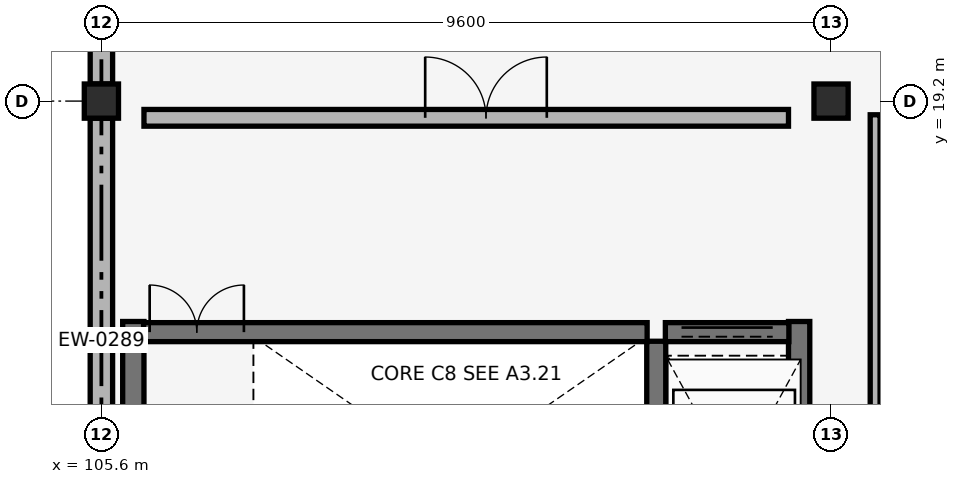
"""IFC4 building model, lengths in metres.
Left out: names, types, materials, properties, quantities, classifications, styles, units other than length and angle.
Written with IfcOpenShell. Run it as: python <this file> out.ifc"""

import sys

from ifc_helpers import new_model, si_unit, direction, frame, frame_2d, origin, origin_2d, place, context, subcontext, project, spatial, rectangle, extrude, element, fill, save


model = new_model("IFC4")
c1 = context("Model", 3, precision=1e-05, world=origin(), true_north=direction((0.0, 1.0)))
c2 = subcontext(c1, "Body", "Model", "MODEL_VIEW")
j1 = project(units=[si_unit("LENGTHUNIT", "METRE"), si_unit("PLANEANGLEUNIT", "RADIAN")], contexts=[c1])
p1 = place(None, origin())
s1 = spatial("IfcSite", under=j1, at=p1, CompositionType="ELEMENT")
p2 = place(p1, origin())
s2 = spatial("IfcBuilding", under=s1, at=p2, CompositionType="ELEMENT")
p3 = place(p2, frame((0.0, 0.0, 16.66)))
s3 = spatial("IfcBuildingStorey", under=s2, at=p3, CompositionType="ELEMENT", Elevation=16.66)
for number, where, z_axis, x_axis in (
    (1, (105.6, 19.2, 0.0), (0.0, 0.0, 1.0), (1.0, 0.0, 0.0)),
    (2, (115.2, 19.2, 0.0), (0.0, 0.0, 1.0), (1.0, 0.0, 0.0)),
):
    element("IfcColumn", number, at=place(p3, frame(where, z_axis=z_axis, x_axis=x_axis)), inside=s3, PredefinedType="COLUMN", context=c2, shape_type="SweptSolid", body=[
        extrude(rectangle(XDim=0.45, YDim=0.45, at=origin_2d()), origin(), (0.0, 0.0, 1.0), 4.08),
    ])
p4 = place(p3, frame((105.6, 18.975, 0.0), z_axis=(0.0, 0.0, 1.0), x_axis=(0.0, -1.0, 0.0)))
e3 = element("IfcWall", 3, at=p4, inside=s3, PredefinedType="SOLIDWALL", context=c2, shape_type="SweptSolid", body=[
    extrude(rectangle(XDim=6.75, YDim=0.295, at=frame_2d((3.375, 0.0))), origin(), (0.0, 0.0, 1.0), 3.06),
])
p5 = place(p3, frame((105.6, 26.175, 0.0), z_axis=(0.0, 0.0, 1.0), x_axis=(0.0, -1.0, 0.0)))
e4 = element("IfcWall", 4, at=p5, inside=s3, PredefinedType="SOLIDWALL", context=c2, shape_type="SweptSolid", body=[
    extrude(rectangle(XDim=6.75, YDim=0.295, at=frame_2d((3.375, 0.0))), origin(), (0.0, 0.0, 1.0), 3.06),
])
p6 = place(p5, frame((1.177, 0.0, 0.88)))
e5 = element("IfcOpeningElement", 5, at=p6, cuts=e4, PredefinedType="OPENING", context=c2, shape_type="SweptSolid", body=[
    extrude(rectangle(XDim=1.02, YDim=1.88, at=frame_2d((0.51, 0.94))), frame((0.0, 0.157, 0.0), z_axis=(0.0, -1.0, 0.0), x_axis=(1.0, 0.0, 0.0)), (0.0, 0.0, 1.0), 0.315),
])
p7 = place(p5, frame((2.865, 0.0, 0.88)))
e6 = element("IfcOpeningElement", 6, at=p7, cuts=e4, PredefinedType="OPENING", context=c2, shape_type="SweptSolid", body=[
    extrude(rectangle(XDim=1.02, YDim=1.88, at=frame_2d((0.51, 0.94))), frame((0.0, 0.157, 0.0), z_axis=(0.0, -1.0, 0.0), x_axis=(1.0, 0.0, 0.0)), (0.0, 0.0, 1.0), 0.315),
])
p8 = place(p5, frame((4.552, 0.0, 0.88)))
e7 = element("IfcOpeningElement", 7, at=p8, cuts=e4, PredefinedType="OPENING", context=c2, shape_type="SweptSolid", body=[
    extrude(rectangle(XDim=1.02, YDim=1.88, at=frame_2d((0.51, 0.94))), frame((0.0, 0.157, 0.0), z_axis=(0.0, -1.0, 0.0), x_axis=(1.0, 0.0, 0.0)), (0.0, 0.0, 1.0), 0.315),
])
for number, where, z_axis, x_axis in (
    (8, (106.02, 12.22, 0.0), (0.0, 0.0, 1.0), (0.0, 1.0, 0.0)),
    (9, (114.78, 12.22, 0.0), (0.0, 0.0, 1.0), (0.0, 1.0, 0.0)),
):
    element("IfcWall", number, at=place(p3, frame(where, z_axis=z_axis, x_axis=x_axis)), inside=s3, PredefinedType="SHEAR", context=c2, shape_type="SweptSolid", body=[
        extrude(rectangle(XDim=4.08, YDim=0.28, at=frame_2d((2.04, 0.0))), origin(), (0.0, 0.0, 1.0), 3.78),
    ])
p9 = place(p3, frame((112.9, 12.5, 0.0), z_axis=(0.0, 0.0, 1.0), x_axis=(0.0, 1.0, 0.0)))
e10 = element("IfcWall", 10, at=p9, inside=s3, PredefinedType="SHEAR", context=c2, shape_type="SweptSolid", body=[
    extrude(rectangle(XDim=3.54, YDim=0.25, at=frame_2d((1.77, 0.0))), origin(), (0.0, 0.0, 1.0), 3.78),
])
p10 = place(p3, frame((106.155, 16.16, 0.0), z_axis=(0.0, 0.0, 1.0), x_axis=(1.0, 0.0, 0.0)))
e11 = element("IfcWall", 11, at=p10, inside=s3, PredefinedType="SHEAR", context=c2, shape_type="SweptSolid", body=[
    extrude(rectangle(XDim=6.625, YDim=0.25, at=frame_2d((3.312, 0.0))), origin(), (0.0, 0.0, 1.0), 3.78),
])
p11 = place(p10, frame((0.08, 0.0, 0.0)))
e12 = element("IfcOpeningElement", 12, at=p11, cuts=e11, PredefinedType="OPENING", context=c2, shape_type="SweptSolid", body=[
    extrude(rectangle(XDim=1.24, YDim=2.15, at=frame_2d((0.62, 1.075))), frame((0.0, 0.135, 0.0), z_axis=(0.0, -1.0, 0.0), x_axis=(1.0, 0.0, 0.0)), (0.0, 0.0, 1.0), 0.27),
])
p12 = place(p3, frame((106.16, 18.98, 0.0), z_axis=(0.0, 0.0, 1.0), x_axis=(1.0, 0.0, 0.0)))
e13 = element("IfcWall", 13, at=p12, inside=s3, PredefinedType="PARTITIONING", context=c2, shape_type="SweptSolid", body=[
    extrude(rectangle(XDim=8.48, YDim=0.22, at=frame_2d((4.24, 0.0))), origin(), (0.0, 0.0, 1.0), 3.19),
])
p13 = place(p12, frame((3.7, 0.0, 0.0)))
e14 = element("IfcOpeningElement", 14, at=p13, cuts=e13, PredefinedType="OPENING", context=c2, shape_type="SweptSolid", body=[
    extrude(rectangle(XDim=1.6, YDim=2.2, at=frame_2d((0.8, 1.1))), frame((0.0, 0.12, 0.0), z_axis=(0.0, -1.0, 0.0), x_axis=(1.0, 0.0, 0.0)), (0.0, 0.0, 1.0), 0.24),
])
p14 = place(p3, frame((113.02, 16.16, 0.0), z_axis=(0.0, 0.0, 1.0), x_axis=(1.0, 0.0, 0.0)))
e15 = element("IfcWall", 15, at=p14, inside=s3, PredefinedType="SHEAR", context=c2, shape_type="SweptSolid", body=[
    extrude(rectangle(XDim=1.625, YDim=0.25, at=frame_2d((0.812, 0.0))), origin(), (0.0, 0.0, 1.0), 3.78),
])
p15 = place(p14, frame((0.212, 0.0, 0.0)))
e16 = element("IfcOpeningElement", 16, at=p15, cuts=e15, PredefinedType="OPENING", context=c2, shape_type="SweptSolid", body=[
    extrude(rectangle(XDim=1.2, YDim=2.15, at=frame_2d((0.6, 1.075))), frame((0.0, 0.135, 0.0), z_axis=(0.0, -1.0, 0.0), x_axis=(1.0, 0.0, 0.0)), (0.0, 0.0, 1.0), 0.27),
])
p16 = place(p3, frame((115.78, 0.149, 0.0), z_axis=(0.0, 0.0, 1.0), x_axis=(0.0, 1.0, 0.0)))
e17 = element("IfcWall", 17, at=p16, inside=s3, PredefinedType="PARTITIONING", context=c2, shape_type="SweptSolid", body=[
    extrude(rectangle(XDim=18.871, YDim=0.13, at=frame_2d((9.435, 0.0))), origin(), (0.0, 0.0, 1.0), 3.09),
])
p17 = place(p16, frame((8.76, 0.0, 0.0)))
e18 = element("IfcOpeningElement", 18, at=p17, cuts=e17, PredefinedType="OPENING", context=c2, shape_type="SweptSolid", body=[
    extrude(rectangle(XDim=1.35, YDim=2.12, at=frame_2d((0.675, 1.06))), frame((0.0, 0.075, 0.0), z_axis=(0.0, -1.0, 0.0), x_axis=(1.0, 0.0, 0.0)), (0.0, 0.0, 1.0), 0.15),
])
p18 = place(p11, origin())
e19 = element("IfcDoor", 19, at=p18, inside=s3, OperationType="DOUBLE_DOOR_SINGLE_SWING", PredefinedType="DOOR", context=c2, shape_type="SweptSolid", body=[
    extrude(rectangle(XDim=1.24, YDim=2.15, at=frame_2d((0.62, 1.075))), frame((0.0, 0.025, 0.0), z_axis=(0.0, -1.0, 0.0), x_axis=(1.0, 0.0, 0.0)), (0.0, 0.0, 1.0), 0.05),
])
fill(e12, e19)
p19 = place(p13, origin())
e20 = element("IfcDoor", 20, at=p19, inside=s3, OperationType="DOUBLE_DOOR_SINGLE_SWING", PredefinedType="DOOR", context=c2, shape_type="SweptSolid", body=[
    extrude(rectangle(XDim=1.6, YDim=2.2, at=frame_2d((0.8, 1.1))), frame((0.0, 0.025, 0.0), z_axis=(0.0, -1.0, 0.0), x_axis=(1.0, 0.0, 0.0)), (0.0, 0.0, 1.0), 0.05),
])
fill(e14, e20)
p20 = place(p15, origin())
e21 = element("IfcDoor", 21, at=p20, inside=s3, OperationType="DOUBLE_DOOR_SLIDING", PredefinedType="DOOR", context=c2, shape_type="SweptSolid", body=[
    extrude(rectangle(XDim=1.2, YDim=2.15, at=frame_2d((0.6, 1.075))), frame((0.0, 0.025, 0.0), z_axis=(0.0, -1.0, 0.0), x_axis=(1.0, 0.0, 0.0)), (0.0, 0.0, 1.0), 0.05),
])
fill(e16, e21)
save(model, sys.argv[1])
